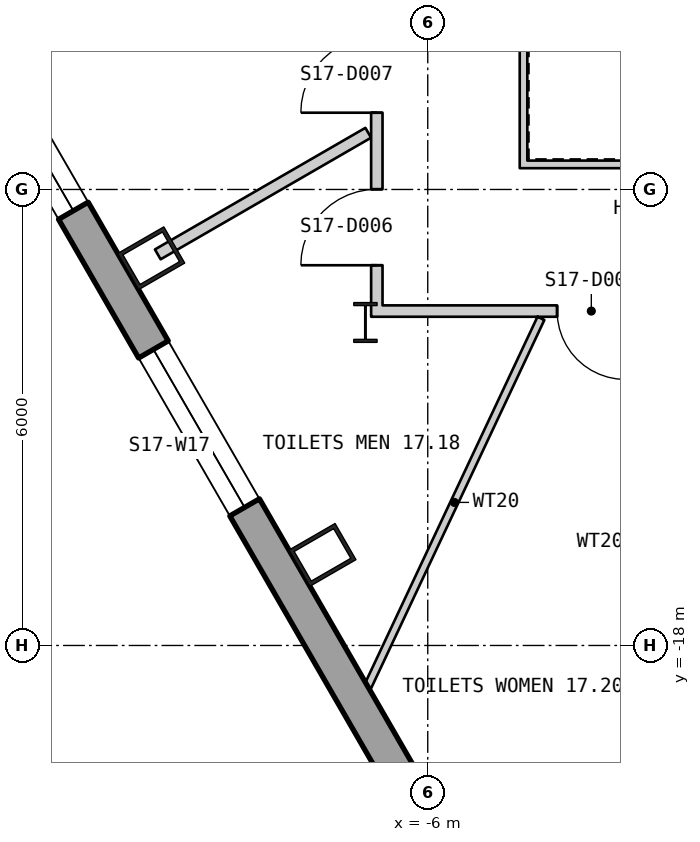
"""IFC4 building model, lengths in metres.
Left out: names, types, materials, properties, quantities, classifications, styles, units other than length and angle.
Written with IfcOpenShell. Run it as: python <this file> out.ifc"""

import sys

from ifc_helpers import new_model, si_unit, direction, frame, frame_2d, origin, origin_2d, place, context, subcontext, project, spatial, polyline, rectangle, hollow_rectangle, i_section, outline, extrude, element, fill, save


model = new_model("IFC4")
c1 = context("Model", 3, precision=1e-05, world=origin(), true_north=direction((0.0, 1.0)))
c2 = subcontext(c1, "Body", "Model", "MODEL_VIEW")
j1 = project(units=[si_unit("LENGTHUNIT", "METRE"), si_unit("PLANEANGLEUNIT", "RADIAN")], contexts=[c1])
p1 = place(None, origin())
s1 = spatial("IfcSite", under=j1, at=p1, CompositionType="ELEMENT")
p2 = place(p1, origin())
s2 = spatial("IfcBuilding", under=s1, at=p2, CompositionType="ELEMENT")
p3 = place(p2, frame((0.0, 0.0, 227.7)))
s3 = spatial("IfcBuildingStorey", under=s2, at=p3, CompositionType="ELEMENT", Elevation=227.7)
for number, where, z_axis, x_axis in (
    (1, (-9.638, -12.905, 0.0), (0.0, 0.0, 1.0), (0.5, -0.866, 0.0)),
    (2, (-7.385, -16.808, 0.0), (0.0, 0.0, 1.0), (0.5, -0.866, 0.0)),
):
    element("IfcColumn", number, at=place(p3, frame(where, z_axis=z_axis, x_axis=x_axis)), inside=s3, PredefinedType="COLUMN", context=c2, shape_type="SweptSolid", body=[
        extrude(hollow_rectangle(XDim=0.55, YDim=0.7, WallThickness=0.05, at=origin_2d()), origin(), (0.0, 0.0, 1.0), 3.9),
    ])
p4 = place(p3, frame((-6.82, -13.75, 0.0), z_axis=(0.0, 0.0, 1.0), x_axis=(1.0, 0.0, 0.0)))
e3 = element("IfcColumn", 3, at=p4, inside=s3, PredefinedType="COLUMN", context=c2, shape_type="SweptSolid", body=[
    extrude(i_section(OverallWidth=0.306, OverallDepth=0.524, WebThickness=0.021, FlangeThickness=0.04, at=origin_2d()), origin(), (0.0, 0.0, 1.0), 3.9),
])
p5 = place(p3, frame((-26.075, 14.415, -0.18), z_axis=(0.0, 0.0, 1.0), x_axis=(0.499999194392, -0.866025868902, 0.0)))
e4 = element("IfcWall", 4, at=p5, inside=s3, PredefinedType="SOLIDWALL", context=c2, shape_type="SweptSolid", body=[
    extrude(outline(polyline([(-0.13, -0.225), (45.86, -0.225), (45.6, 0.225), (0.13, 0.225), (-0.13, -0.225)])), origin(), (0.0, 0.0, 1.0), 3.68),
])
p6 = place(p5, frame((1.424, 0.0, 1.08)))
e5 = element("IfcOpeningElement", 5, at=p6, cuts=e4, PredefinedType="OPENING", context=c2, shape_type="SweptSolid", body=[
    extrude(rectangle(XDim=2.4, YDim=2.0, at=frame_2d((1.2, 1.0))), frame((0.0, 0.235, 0.0), z_axis=(0.0, -1.0, 0.0), x_axis=(1.0, 0.0, 0.0)), (0.0, 0.0, 1.0), 0.47),
])
p7 = place(p5, frame((5.892, 0.0, 1.08)))
e6 = element("IfcOpeningElement", 6, at=p7, cuts=e4, PredefinedType="OPENING", context=c2, shape_type="SweptSolid", body=[
    extrude(rectangle(XDim=2.4, YDim=2.0, at=frame_2d((1.2, 1.0))), frame((0.0, 0.235, 0.0), z_axis=(0.0, -1.0, 0.0), x_axis=(1.0, 0.0, 0.0)), (0.0, 0.0, 1.0), 0.47),
])
p8 = place(p5, frame((10.399, 0.0, 1.08)))
e7 = element("IfcOpeningElement", 7, at=p8, cuts=e4, PredefinedType="OPENING", context=c2, shape_type="SweptSolid", body=[
    extrude(rectangle(XDim=2.4, YDim=2.0, at=frame_2d((1.2, 1.0))), frame((0.0, 0.235, 0.0), z_axis=(0.0, -1.0, 0.0), x_axis=(1.0, 0.0, 0.0)), (0.0, 0.0, 1.0), 0.47),
])
p9 = place(p5, frame((19.412, 0.0, 1.08)))
e8 = element("IfcOpeningElement", 8, at=p9, cuts=e4, PredefinedType="OPENING", context=c2, shape_type="SweptSolid", body=[
    extrude(rectangle(XDim=2.4, YDim=2.0, at=frame_2d((1.2, 1.0))), frame((0.0, 0.235, 0.0), z_axis=(0.0, -1.0, 0.0), x_axis=(1.0, 0.0, 0.0)), (0.0, 0.0, 1.0), 0.47),
])
p10 = place(p5, frame((23.918, 0.0, 1.08)))
e9 = element("IfcOpeningElement", 9, at=p10, cuts=e4, PredefinedType="OPENING", context=c2, shape_type="SweptSolid", body=[
    extrude(rectangle(XDim=2.4, YDim=2.0, at=frame_2d((1.2, 1.0))), frame((0.0, 0.235, 0.0), z_axis=(0.0, -1.0, 0.0), x_axis=(1.0, 0.0, 0.0)), (0.0, 0.0, 1.0), 0.47),
])
p11 = place(p5, frame((28.425, 0.0, 1.08)))
e10 = element("IfcOpeningElement", 10, at=p11, cuts=e4, PredefinedType="OPENING", context=c2, shape_type="SweptSolid", body=[
    extrude(rectangle(XDim=2.4, YDim=2.0, at=frame_2d((1.2, 1.0))), frame((0.0, 0.235, 0.0), z_axis=(0.0, -1.0, 0.0), x_axis=(1.0, 0.0, 0.0)), (0.0, 0.0, 1.0), 0.47),
])
p12 = place(p5, frame((32.932, 0.0, 1.08)))
e11 = element("IfcOpeningElement", 11, at=p12, cuts=e4, PredefinedType="OPENING", context=c2, shape_type="SweptSolid", body=[
    extrude(rectangle(XDim=2.4, YDim=2.0, at=frame_2d((1.2, 1.0))), frame((0.0, 0.235, 0.0), z_axis=(0.0, -1.0, 0.0), x_axis=(1.0, 0.0, 0.0)), (0.0, 0.0, 1.0), 0.47),
])
p13 = place(p5, frame((41.907, 0.0, 1.08)))
e12 = element("IfcOpeningElement", 12, at=p13, cuts=e4, PredefinedType="OPENING", context=c2, shape_type="SweptSolid", body=[
    extrude(rectangle(XDim=2.4, YDim=2.0, at=frame_2d((1.2, 1.0))), frame((0.0, 0.235, 0.0), z_axis=(0.0, -1.0, 0.0), x_axis=(1.0, 0.0, 0.0)), (0.0, 0.0, 1.0), 0.47),
])
p14 = place(p3, frame((-4.79, -11.67, 0.0), z_axis=(0.0, 0.0, 1.0), x_axis=(1.0, 0.0, 0.0)))
e13 = element("IfcWall", 13, at=p14, inside=s3, PredefinedType="PARTITIONING", context=c2, shape_type="SweptSolid", body=[
    extrude(rectangle(XDim=9.58, YDim=0.1, at=frame_2d((4.79, 0.0))), origin(), (0.0, 0.0, 1.0), 3.7),
])
p15 = place(p3, frame((-4.74, -3.58, 0.0), z_axis=(0.0, 0.0, 1.0), x_axis=(0.0, -1.0, 0.0)))
e14 = element("IfcWall", 14, at=p15, inside=s3, PredefinedType="PARTITIONING", context=c2, shape_type="SweptSolid", body=[
    extrude(rectangle(XDim=8.04, YDim=0.1, at=frame_2d((4.02, 0.0))), origin(), (0.0, 0.0, 1.0), 3.7),
])
p16 = place(p3, frame((-9.552, -12.854, 0.0), z_axis=(0.0, 0.0, 1.0), x_axis=(0.865847012661, 0.500308855275, 0.0)))
e15 = element("IfcWall", 15, at=p16, inside=s3, PredefinedType="PARTITIONING", context=c2, shape_type="SweptSolid", body=[
    extrude(rectangle(XDim=3.198, YDim=0.15, at=frame_2d((1.599, 0.0))), origin(), (0.0, 0.0, 1.0), 3.7),
])
p17 = place(p3, frame((-6.789, -18.539, 0.0), z_axis=(0.0, 0.0, 1.0), x_axis=(0.425635061069, 0.904894908146, 0.0)))
e16 = element("IfcWall", 16, at=p17, inside=s3, PredefinedType="PARTITIONING", context=c2, shape_type="SweptSolid", body=[
    extrude(rectangle(XDim=5.352, YDim=0.1, at=frame_2d((2.676, 0.0))), origin(), (0.0, 0.0, 1.0), 3.7),
])
p18 = place(p3, frame((-6.67, -13.675, 0.0), z_axis=(0.0, 0.0, 1.0), x_axis=(0.0, 1.0, 0.0)))
e17 = element("IfcWall", 17, at=p18, inside=s3, PredefinedType="PARTITIONING", context=c2, shape_type="SweptSolid", body=[
    extrude(rectangle(XDim=10.263, YDim=0.15, at=frame_2d((5.131, 0.0))), origin(), (0.0, 0.0, 1.0), 3.11),
])
p19 = place(p18, frame((0.678, 0.0, 0.0)))
e18 = element("IfcOpeningElement", 18, at=p19, cuts=e17, PredefinedType="OPENING", context=c2, shape_type="SweptSolid", body=[
    extrude(rectangle(XDim=1.0, YDim=2.1, at=frame_2d((0.5, 1.05))), frame((0.0, 0.085, 0.0), z_axis=(0.0, -1.0, 0.0), x_axis=(1.0, 0.0, 0.0)), (0.0, 0.0, 1.0), 0.17),
])
p20 = place(p18, frame((2.685, 0.0, 0.0)))
e19 = element("IfcOpeningElement", 19, at=p20, cuts=e17, PredefinedType="OPENING", context=c2, shape_type="SweptSolid", body=[
    extrude(rectangle(XDim=1.0, YDim=2.1, at=frame_2d((0.5, 1.05))), frame((0.0, 0.085, 0.0), z_axis=(0.0, -1.0, 0.0), x_axis=(1.0, 0.0, 0.0)), (0.0, 0.0, 1.0), 0.17),
])
p21 = place(p3, frame((-6.595, -13.6, 0.0), z_axis=(0.0, 0.0, 1.0), x_axis=(1.0, 0.0, 0.0)))
e20 = element("IfcWall", 20, at=p21, inside=s3, PredefinedType="PARTITIONING", context=c2, shape_type="SweptSolid", body=[
    extrude(rectangle(XDim=4.895, YDim=0.15, at=frame_2d((2.447, 0.0))), origin(), (0.0, 0.0, 1.0), 2.91),
])
p22 = place(p21, frame((2.297, 0.0, 0.0)))
e21 = element("IfcOpeningElement", 21, at=p22, cuts=e20, PredefinedType="OPENING", context=c2, shape_type="SweptSolid", body=[
    extrude(rectangle(XDim=0.9, YDim=2.1, at=frame_2d((0.45, 1.05))), frame((0.0, 0.085, 0.0), z_axis=(0.0, -1.0, 0.0), x_axis=(1.0, 0.0, 0.0)), (0.0, 0.0, 1.0), 0.17),
])
p23 = place(p21, frame((3.623, 0.0, 0.0)))
e22 = element("IfcOpeningElement", 22, at=p23, cuts=e20, PredefinedType="OPENING", context=c2, shape_type="SweptSolid", body=[
    extrude(rectangle(XDim=1.0, YDim=2.1, at=frame_2d((0.5, 1.05))), frame((0.0, 0.085, 0.0), z_axis=(0.0, -1.0, 0.0), x_axis=(1.0, 0.0, 0.0)), (0.0, 0.0, 1.0), 0.17),
])
p24 = place(p11, origin())
e23 = element("IfcWindow", 23, at=p24, inside=s3, PartitioningType="SINGLE_PANEL", PredefinedType="WINDOW", context=c2, shape_type="SweptSolid", body=[
    extrude(rectangle(XDim=2.4, YDim=2.0, at=frame_2d((1.2, 1.0))), frame((0.0, 0.105, 0.0), z_axis=(0.0, -1.0, 0.0), x_axis=(1.0, 0.0, 0.0)), (0.0, 0.0, 1.0), 0.06),
])
fill(e10, e23)
p25 = place(p12, origin())
e24 = element("IfcWindow", 24, at=p25, inside=s3, PartitioningType="SINGLE_PANEL", PredefinedType="WINDOW", context=c2, shape_type="SweptSolid", body=[
    extrude(rectangle(XDim=2.4, YDim=2.0, at=frame_2d((1.2, 1.0))), frame((0.0, 0.105, 0.0), z_axis=(0.0, -1.0, 0.0), x_axis=(1.0, 0.0, 0.0)), (0.0, 0.0, 1.0), 0.06),
])
fill(e11, e24)
p26 = place(p19, origin())
e25 = element("IfcDoor", 25, at=p26, inside=s3, OperationType="SINGLE_SWING_RIGHT", PredefinedType="DOOR", context=c2, shape_type="SweptSolid", body=[
    extrude(rectangle(XDim=1.0, YDim=2.1, at=frame_2d((0.5, 1.05))), frame((0.0, 0.025, 0.0), z_axis=(0.0, -1.0, 0.0), x_axis=(1.0, 0.0, 0.0)), (0.0, 0.0, 1.0), 0.05),
])
fill(e18, e25)
p27 = place(p20, origin())
e26 = element("IfcDoor", 26, at=p27, inside=s3, OperationType="SINGLE_SWING_RIGHT", PredefinedType="DOOR", context=c2, shape_type="SweptSolid", body=[
    extrude(rectangle(XDim=1.0, YDim=2.1, at=frame_2d((0.5, 1.05))), frame((0.0, 0.025, 0.0), z_axis=(0.0, -1.0, 0.0), x_axis=(1.0, 0.0, 0.0)), (0.0, 0.0, 1.0), 0.05),
])
fill(e19, e26)
p28 = place(p22, origin())
e27 = element("IfcDoor", 27, at=p28, inside=s3, OperationType="SINGLE_SWING_RIGHT", PredefinedType="DOOR", context=c2, shape_type="SweptSolid", body=[
    extrude(rectangle(XDim=0.9, YDim=2.1, at=frame_2d((0.45, 1.05))), frame((0.0, 0.025, 0.0), z_axis=(0.0, -1.0, 0.0), x_axis=(1.0, 0.0, 0.0)), (0.0, 0.0, 1.0), 0.05),
])
fill(e21, e27)
save(model, sys.argv[1])
